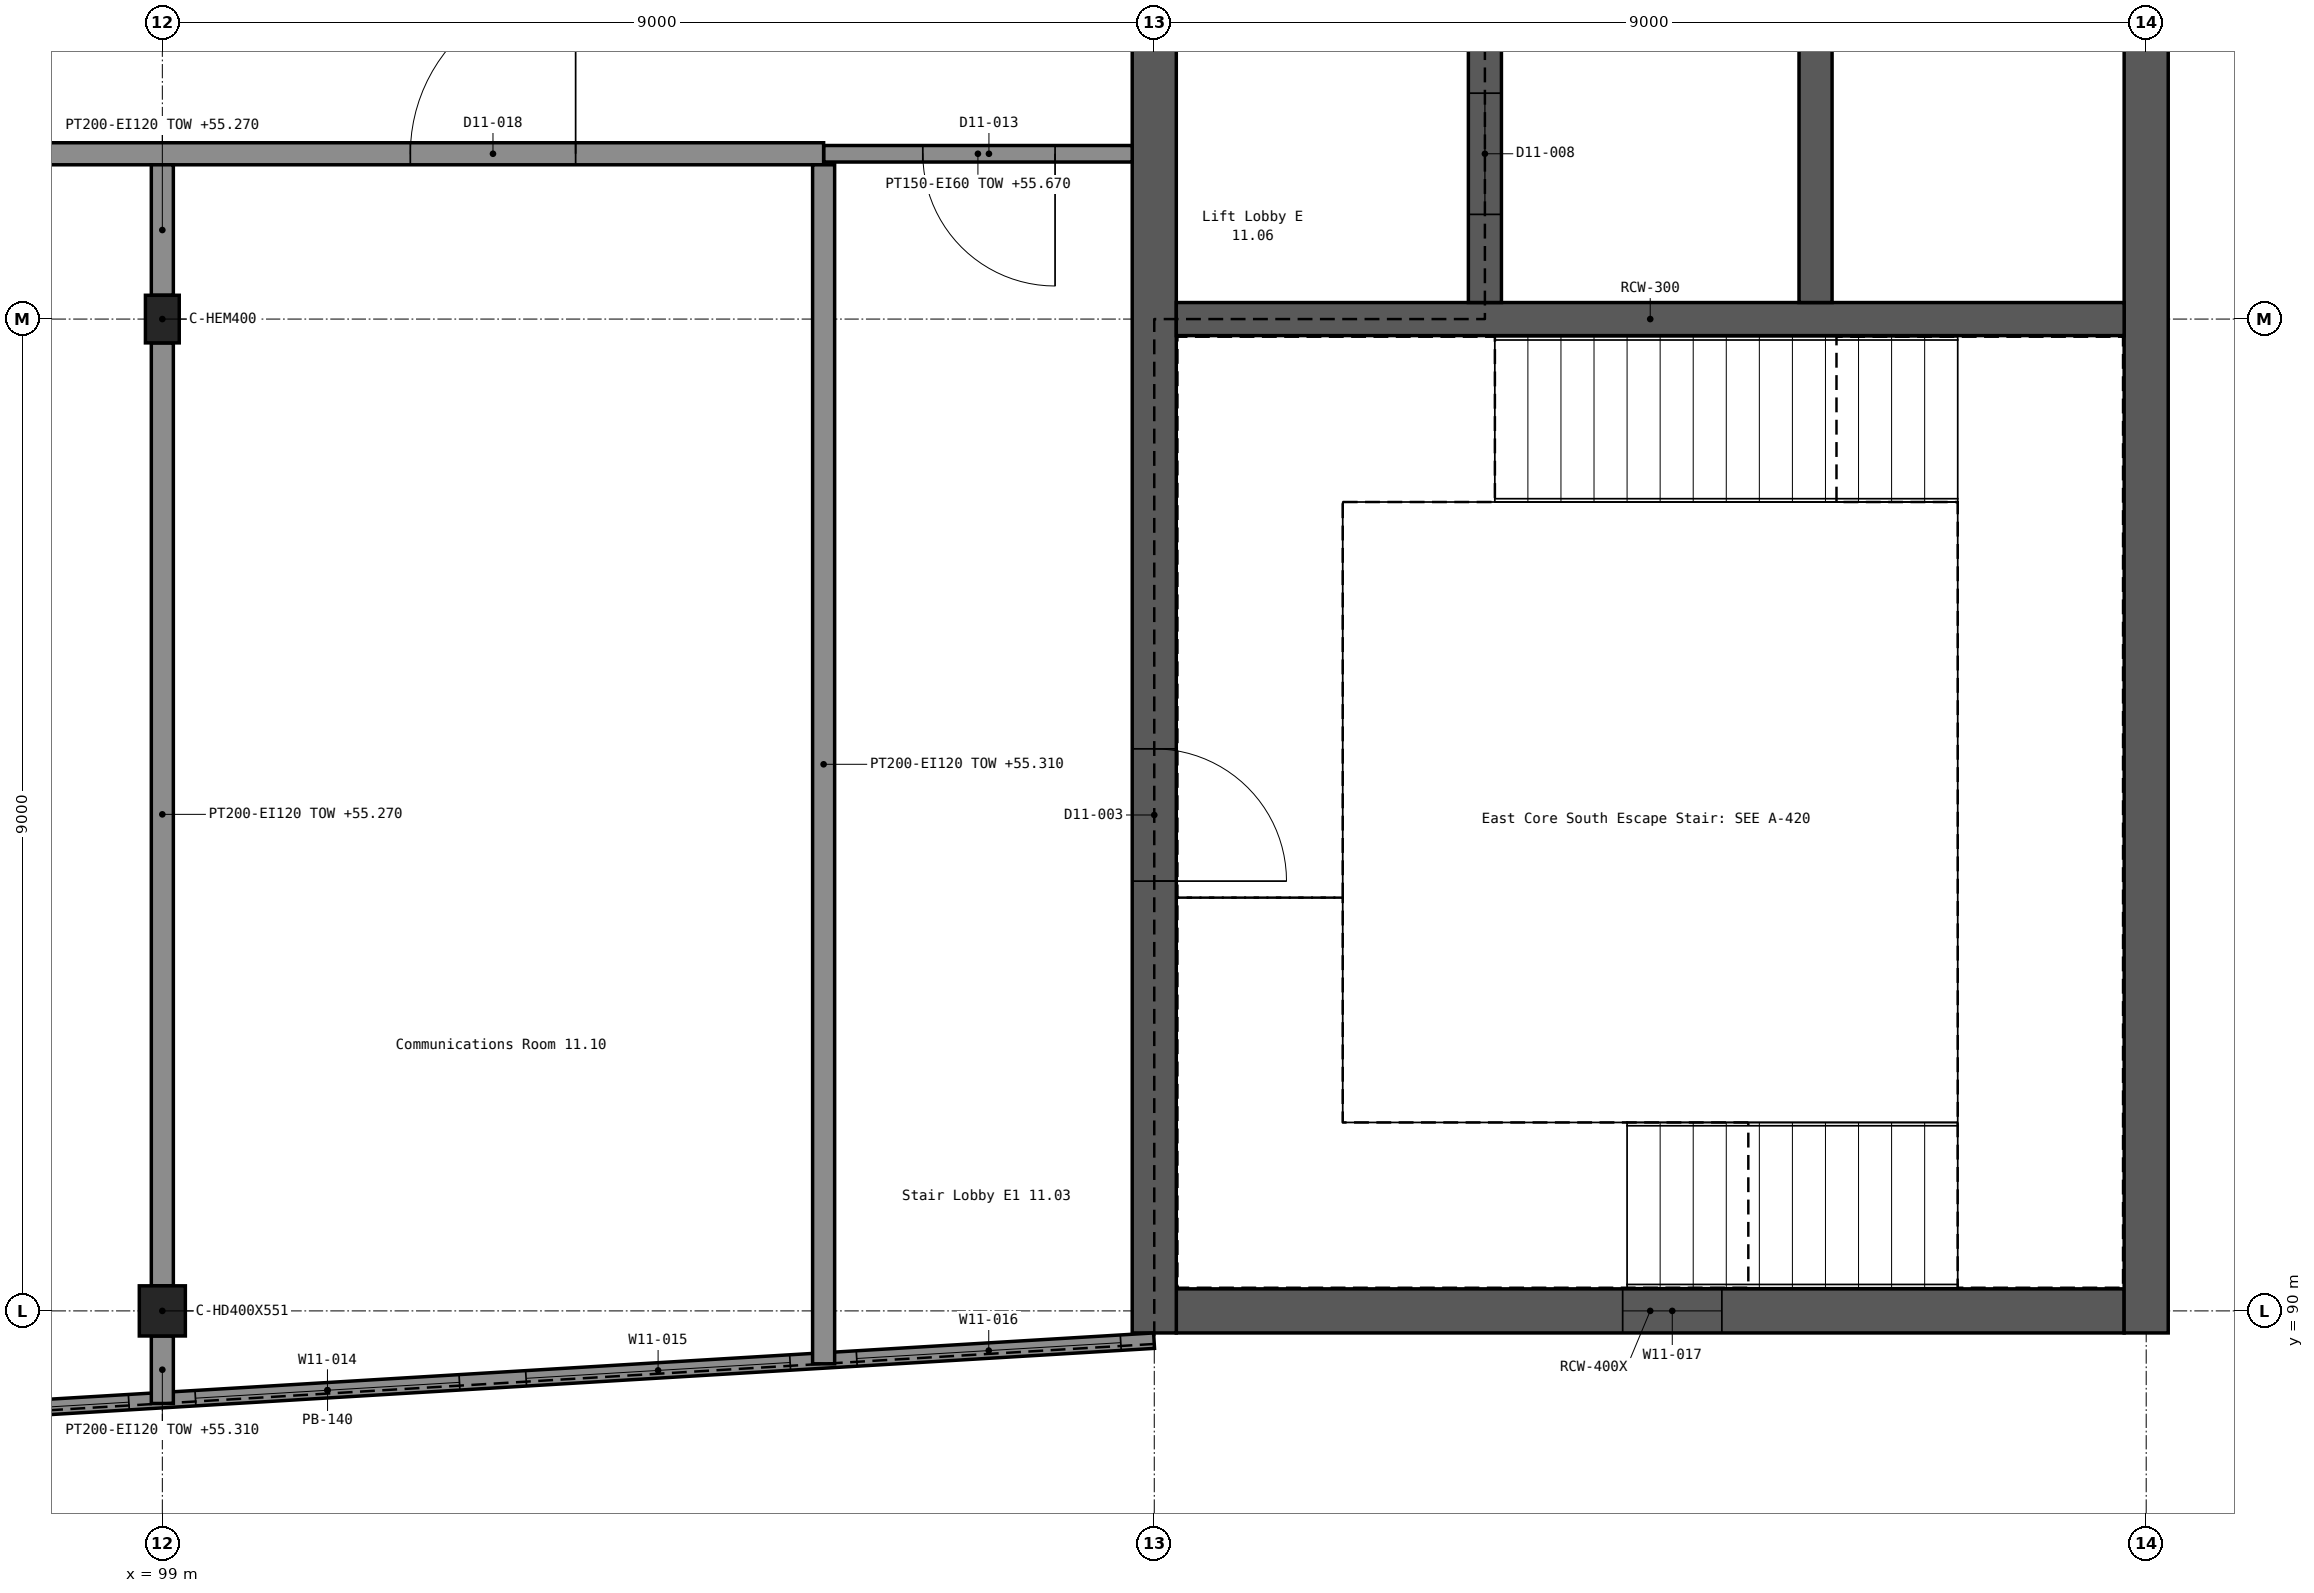
"""IFC4 building model, lengths in metres.
Left out: names, types, materials, properties, quantities, classifications, styles, units other than length and angle.
Written with IfcOpenShell. Run it as: python <this file> out.ifc"""

import sys

from ifc_helpers import new_model, si_unit, direction, frame, frame_2d, origin, origin_2d, place, context, subcontext, project, spatial, rectangle, i_section, extrude, element, fill, save


model = new_model("IFC4")
c1 = context("Model", 3, precision=1e-05, world=origin(), true_north=direction((0.0, 1.0)))
c2 = subcontext(c1, "Body", "Model", "MODEL_VIEW")
j1 = project(units=[si_unit("LENGTHUNIT", "METRE"), si_unit("PLANEANGLEUNIT", "RADIAN")], contexts=[c1])
p1 = place(None, origin())
s1 = spatial("IfcSite", under=j1, at=p1, CompositionType="ELEMENT")
p2 = place(p1, origin())
s2 = spatial("IfcBuilding", under=s1, at=p2, CompositionType="ELEMENT")
p3 = place(p2, frame((0.0, 0.0, 51.9)))
s3 = spatial("IfcBuildingStorey", under=s2, at=p3, CompositionType="ELEMENT", Elevation=51.9)
p4 = place(p3, frame((108.2, 90.0, 0.0), z_axis=(0.0, 0.0, 1.0), x_axis=(1.0, 0.0, 0.0)))
e1 = element("IfcWall", 1, at=p4, inside=s3, PredefinedType="SHEAR", context=c2, shape_type="SweptSolid", body=[
    extrude(rectangle(XDim=8.6, YDim=0.4, at=frame_2d((4.3, 0.0))), origin(), (0.0, 0.0, 1.0), 3.9),
])
p5 = place(p4, frame((4.05, 0.0, 1.2)))
e2 = element("IfcOpeningElement", 2, at=p5, cuts=e1, PredefinedType="OPENING", context=c2, shape_type="SweptSolid", body=[
    extrude(rectangle(XDim=0.9, YDim=1.5, at=frame_2d((0.45, 0.75))), frame((0.0, 0.211, 0.0), z_axis=(0.0, -1.0, 0.0), x_axis=(1.0, 0.0, 0.0)), (0.0, 0.0, 1.0), 0.422),
])
p6 = place(p3, frame((108.0, 89.8, 0.0), z_axis=(0.0, 0.0, 1.0), x_axis=(0.0, 1.0, 0.0)))
e3 = element("IfcWall", 3, at=p6, inside=s3, PredefinedType="SHEAR", context=c2, shape_type="SweptSolid", body=[
    extrude(rectangle(XDim=27.4, YDim=0.4, at=frame_2d((13.7, 0.0))), origin(), (0.0, 0.0, 1.0), 3.9),
])
p7 = place(p6, frame((4.1, 0.0, 0.0)))
e4 = element("IfcOpeningElement", 4, at=p7, cuts=e3, PredefinedType="OPENING", context=c2, shape_type="SweptSolid", body=[
    extrude(rectangle(XDim=1.2, YDim=2.1, at=frame_2d((0.6, 1.05))), frame((0.0, 0.211, 0.0), z_axis=(0.0, -1.0, 0.0), x_axis=(1.0, 0.0, 0.0)), (0.0, 0.0, 1.0), 0.422),
])
p8 = place(p6, frame((22.1, 0.0, 0.0)))
e5 = element("IfcOpeningElement", 5, at=p8, cuts=e3, PredefinedType="OPENING", context=c2, shape_type="SweptSolid", body=[
    extrude(rectangle(XDim=1.2, YDim=2.1, at=frame_2d((0.6, 1.05))), frame((0.0, 0.211, 0.0), z_axis=(0.0, -1.0, 0.0), x_axis=(1.0, 0.0, 0.0)), (0.0, 0.0, 1.0), 0.422),
])
p9 = place(p6, frame((12.5, 0.0, 0.0)))
e6 = element("IfcOpeningElement", 6, at=p9, cuts=e3, PredefinedType="OPENING", context=c2, shape_type="SweptSolid", body=[
    extrude(rectangle(XDim=2.0, YDim=2.1, at=frame_2d((1.0, 1.05))), frame((0.0, 0.211, 0.0), z_axis=(0.0, -1.0, 0.0), x_axis=(1.0, 0.0, 0.0)), (0.0, 0.0, 1.0), 0.422),
])
p10 = place(p3, frame((117.0, 89.8, 0.0), z_axis=(0.0, 0.0, 1.0), x_axis=(0.0, 1.0, 0.0)))
e7 = element("IfcWall", 7, at=p10, inside=s3, PredefinedType="SHEAR", context=c2, shape_type="SweptSolid", body=[
    extrude(rectangle(XDim=27.4, YDim=0.4, at=frame_2d((13.7, 0.0))), origin(), (0.0, 0.0, 1.0), 3.9),
])
p11 = place(p3, frame((108.2, 99.0, 0.0), z_axis=(0.0, 0.0, 1.0), x_axis=(1.0, 0.0, 0.0)))
e8 = element("IfcWall", 8, at=p11, inside=s3, PredefinedType="SHEAR", context=c2, shape_type="SweptSolid", body=[
    extrude(rectangle(XDim=8.6, YDim=0.3, at=frame_2d((4.3, 0.0))), origin(), (0.0, 0.0, 1.0), 3.9),
])
p12 = place(p3, frame((111.0, 99.15, 0.0), z_axis=(0.0, 0.0, 1.0), x_axis=(0.0, 1.0, 0.0)))
e9 = element("IfcWall", 9, at=p12, inside=s3, PredefinedType="SHEAR", context=c2, shape_type="SweptSolid", body=[
    extrude(rectangle(XDim=8.7, YDim=0.3, at=frame_2d((4.35, 0.0))), origin(), (0.0, 0.0, 1.0), 3.9),
])
p13 = place(p12, frame((0.8, 0.0, 0.0)))
e10 = element("IfcOpeningElement", 10, at=p13, cuts=e9, PredefinedType="OPENING", context=c2, shape_type="SweptSolid", body=[
    extrude(rectangle(XDim=1.1, YDim=2.1, at=frame_2d((0.55, 1.05))), frame((0.0, 0.161, 0.0), z_axis=(0.0, -1.0, 0.0), x_axis=(1.0, 0.0, 0.0)), (0.0, 0.0, 1.0), 0.322),
])
p14 = place(p12, frame((3.8, 0.0, 0.0)))
e11 = element("IfcOpeningElement", 11, at=p14, cuts=e9, PredefinedType="OPENING", context=c2, shape_type="SweptSolid", body=[
    extrude(rectangle(XDim=1.1, YDim=2.1, at=frame_2d((0.55, 1.05))), frame((0.0, 0.161, 0.0), z_axis=(0.0, -1.0, 0.0), x_axis=(1.0, 0.0, 0.0)), (0.0, 0.0, 1.0), 0.322),
])
p15 = place(p12, frame((6.8, 0.0, 0.0)))
e12 = element("IfcOpeningElement", 12, at=p15, cuts=e9, PredefinedType="OPENING", context=c2, shape_type="SweptSolid", body=[
    extrude(rectangle(XDim=1.1, YDim=2.1, at=frame_2d((0.55, 1.05))), frame((0.0, 0.161, 0.0), z_axis=(0.0, -1.0, 0.0), x_axis=(1.0, 0.0, 0.0)), (0.0, 0.0, 1.0), 0.322),
])
p16 = place(p3, frame((114.0, 99.15, 0.0), z_axis=(0.0, 0.0, 1.0), x_axis=(0.0, 1.0, 0.0)))
e13 = element("IfcWall", 13, at=p16, inside=s3, PredefinedType="SHEAR", context=c2, shape_type="SweptSolid", body=[
    extrude(rectangle(XDim=8.7, YDim=0.3, at=frame_2d((4.35, 0.0))), origin(), (0.0, 0.0, 1.0), 3.9),
])
p17 = place(p3, frame((99.0, 90.0, 0.0), z_axis=(0.0, 0.0, 1.0), x_axis=(1.0, 0.0, 0.0)))
e14 = element("IfcColumn", 14, at=p17, inside=s3, PredefinedType="COLUMN", context=c2, shape_type="SweptSolid", body=[
    extrude(i_section(OverallWidth=0.418, OverallDepth=0.455, WebThickness=0.042, FlangeThickness=0.068, FilletRadius=0.015, at=origin_2d()), origin(), (0.0, 0.0, 1.0), 3.9),
])
p18 = place(p3, frame((99.0, 99.0, 0.0), z_axis=(0.0, 0.0, 1.0), x_axis=(1.0, 0.0, 0.0)))
e15 = element("IfcColumn", 15, at=p18, inside=s3, PredefinedType="COLUMN", context=c2, shape_type="SweptSolid", body=[
    extrude(i_section(OverallWidth=0.307, OverallDepth=0.432, WebThickness=0.021, FlangeThickness=0.04, FilletRadius=0.027, at=origin_2d()), origin(), (0.0, 0.0, 1.0), 3.9),
])
p19 = place(p3, frame((93.0, 88.83, 0.0), z_axis=(0.0, 0.0, 1.0), x_axis=(0.998204826037, 0.059892614536, 0.0)))
e16 = element("IfcWall", 16, at=p19, inside=s3, PredefinedType="SOLIDWALL", context=c2, shape_type="SweptSolid", body=[
    extrude(rectangle(XDim=15.025, YDim=0.14, at=frame_2d((7.513, 0.0))), origin(), (0.0, 0.0, 1.0), 3.9),
])
p20 = place(p19, frame((0.301, 0.0, 0.6)))
e17 = element("IfcOpeningElement", 17, at=p20, cuts=e16, PredefinedType="OPENING", context=c2, shape_type="SweptSolid", body=[
    extrude(rectangle(XDim=2.4, YDim=2.4, at=frame_2d((1.2, 1.2))), frame((0.0, 0.081, 0.0), z_axis=(0.0, -1.0, 0.0), x_axis=(1.0, 0.0, 0.0)), (0.0, 0.0, 1.0), 0.162),
])
p21 = place(p19, frame((3.306, 0.0, 0.6)))
e18 = element("IfcOpeningElement", 18, at=p21, cuts=e16, PredefinedType="OPENING", context=c2, shape_type="SweptSolid", body=[
    extrude(rectangle(XDim=2.4, YDim=2.4, at=frame_2d((1.2, 1.2))), frame((0.0, 0.081, 0.0), z_axis=(0.0, -1.0, 0.0), x_axis=(1.0, 0.0, 0.0)), (0.0, 0.0, 1.0), 0.162),
])
p22 = place(p19, frame((6.312, 0.0, 0.6)))
e19 = element("IfcOpeningElement", 19, at=p22, cuts=e16, PredefinedType="OPENING", context=c2, shape_type="SweptSolid", body=[
    extrude(rectangle(XDim=2.4, YDim=2.4, at=frame_2d((1.2, 1.2))), frame((0.0, 0.081, 0.0), z_axis=(0.0, -1.0, 0.0), x_axis=(1.0, 0.0, 0.0)), (0.0, 0.0, 1.0), 0.162),
])
p23 = place(p19, frame((9.317, 0.0, 0.6)))
e20 = element("IfcOpeningElement", 20, at=p23, cuts=e16, PredefinedType="OPENING", context=c2, shape_type="SweptSolid", body=[
    extrude(rectangle(XDim=2.4, YDim=2.4, at=frame_2d((1.2, 1.2))), frame((0.0, 0.081, 0.0), z_axis=(0.0, -1.0, 0.0), x_axis=(1.0, 0.0, 0.0)), (0.0, 0.0, 1.0), 0.162),
])
p24 = place(p19, frame((12.323, 0.0, 0.6)))
e21 = element("IfcOpeningElement", 21, at=p24, cuts=e16, PredefinedType="OPENING", context=c2, shape_type="SweptSolid", body=[
    extrude(rectangle(XDim=2.4, YDim=2.4, at=frame_2d((1.2, 1.2))), frame((0.0, 0.081, 0.0), z_axis=(0.0, -1.0, 0.0), x_axis=(1.0, 0.0, 0.0)), (0.0, 0.0, 1.0), 0.162),
])
p25 = place(p3, frame((105.0, 100.5, 0.0), z_axis=(0.0, 0.0, 1.0), x_axis=(1.0, 0.0, 0.0)))
e22 = element("IfcWall", 22, at=p25, inside=s3, PredefinedType="PARTITIONING", context=c2, shape_type="SweptSolid", body=[
    extrude(rectangle(XDim=2.8, YDim=0.15, at=frame_2d((1.4, 0.0))), origin(), (0.0, 0.0, 1.0), 3.77),
])
p26 = place(p25, frame((0.9, 0.0, 0.0)))
e23 = element("IfcOpeningElement", 23, at=p26, cuts=e22, PredefinedType="OPENING", context=c2, shape_type="SweptSolid", body=[
    extrude(rectangle(XDim=1.2, YDim=2.1, at=frame_2d((0.6, 1.05))), frame((0.0, 0.086, 0.0), z_axis=(0.0, -1.0, 0.0), x_axis=(1.0, 0.0, 0.0)), (0.0, 0.0, 1.0), 0.172),
])
p27 = place(p3, frame((66.0, 100.5, 0.0), z_axis=(0.0, 0.0, 1.0), x_axis=(1.0, 0.0, 0.0)))
e24 = element("IfcWall", 24, at=p27, inside=s3, PredefinedType="PARTITIONING", context=c2, shape_type="SweptSolid", body=[
    extrude(rectangle(XDim=39.0, YDim=0.2, at=frame_2d((19.5, 0.0))), origin(), (0.0, 0.0, 1.0), 3.77),
])
p28 = place(p27, frame((2.25, 0.0, 0.0)))
e25 = element("IfcOpeningElement", 25, at=p28, cuts=e24, PredefinedType="OPENING", context=c2, shape_type="SweptSolid", body=[
    extrude(rectangle(XDim=1.5, YDim=2.4, at=frame_2d((0.75, 1.2))), frame((0.0, 0.111, 0.0), z_axis=(0.0, -1.0, 0.0), x_axis=(1.0, 0.0, 0.0)), (0.0, 0.0, 1.0), 0.222),
])
p29 = place(p27, frame((13.125, 0.0, 0.0)))
e26 = element("IfcOpeningElement", 26, at=p29, cuts=e24, PredefinedType="OPENING", context=c2, shape_type="SweptSolid", body=[
    extrude(rectangle(XDim=1.5, YDim=2.4, at=frame_2d((0.75, 1.2))), frame((0.0, 0.111, 0.0), z_axis=(0.0, -1.0, 0.0), x_axis=(1.0, 0.0, 0.0)), (0.0, 0.0, 1.0), 0.222),
])
p30 = place(p27, frame((27.75, 0.0, 0.0)))
e27 = element("IfcOpeningElement", 27, at=p30, cuts=e24, PredefinedType="OPENING", context=c2, shape_type="SweptSolid", body=[
    extrude(rectangle(XDim=1.5, YDim=2.4, at=frame_2d((0.75, 1.2))), frame((0.0, 0.111, 0.0), z_axis=(0.0, -1.0, 0.0), x_axis=(1.0, 0.0, 0.0)), (0.0, 0.0, 1.0), 0.222),
])
p31 = place(p27, frame((35.25, 0.0, 0.0)))
e28 = element("IfcOpeningElement", 28, at=p31, cuts=e24, PredefinedType="OPENING", context=c2, shape_type="SweptSolid", body=[
    extrude(rectangle(XDim=1.5, YDim=2.4, at=frame_2d((0.75, 1.2))), frame((0.0, 0.111, 0.0), z_axis=(0.0, -1.0, 0.0), x_axis=(1.0, 0.0, 0.0)), (0.0, 0.0, 1.0), 0.222),
])
p32 = place(p3, frame((99.0, 89.16, 0.0), z_axis=(0.0, 0.0, 1.0), x_axis=(0.0, 1.0, 0.0)))
e29 = element("IfcWall", 29, at=p32, inside=s3, PredefinedType="PARTITIONING", context=c2, shape_type="SweptSolid", body=[
    extrude(rectangle(XDim=0.613, YDim=0.2, at=frame_2d((0.306, 0.0))), origin(), (0.0, 0.0, 1.0), 3.41),
])
p33 = place(p3, frame((99.0, 90.228, 0.0), z_axis=(0.0, 0.0, 1.0), x_axis=(0.0, 1.0, 0.0)))
e30 = element("IfcWall", 30, at=p33, inside=s3, PredefinedType="PARTITIONING", context=c2, shape_type="SweptSolid", body=[
    extrude(rectangle(XDim=8.556, YDim=0.2, at=frame_2d((4.278, 0.0))), origin(), (0.0, 0.0, 1.0), 3.37),
])
p34 = place(p3, frame((99.0, 99.216, 0.0), z_axis=(0.0, 0.0, 1.0), x_axis=(0.0, 1.0, 0.0)))
e31 = element("IfcWall", 31, at=p34, inside=s3, PredefinedType="PARTITIONING", context=c2, shape_type="SweptSolid", body=[
    extrude(rectangle(XDim=1.184, YDim=0.2, at=frame_2d((0.592, 0.0))), origin(), (0.0, 0.0, 1.0), 3.37),
])
p35 = place(p3, frame((105.0, 89.52, 0.0), z_axis=(0.0, 0.0, 1.0), x_axis=(0.0, 1.0, 0.0)))
e32 = element("IfcWall", 32, at=p35, inside=s3, PredefinedType="PARTITIONING", context=c2, shape_type="SweptSolid", body=[
    extrude(rectangle(XDim=10.88, YDim=0.2, at=frame_2d((5.44, 0.0))), origin(), (0.0, 0.0, 1.0), 3.41),
])
p36 = place(p21, origin())
e33 = element("IfcWindow", 33, at=p36, inside=s3, PartitioningType="SINGLE_PANEL", PredefinedType="WINDOW", context=c2, shape_type="SweptSolid", body=[
    extrude(rectangle(XDim=2.4, YDim=2.4, at=frame_2d((1.2, 1.2))), frame((0.0, 0.03, 0.0), z_axis=(0.0, -1.0, 0.0), x_axis=(1.0, 0.0, 0.0)), (0.0, 0.0, 1.0), 0.06),
])
fill(e18, e33)
p37 = place(p22, origin())
e34 = element("IfcWindow", 34, at=p37, inside=s3, PartitioningType="SINGLE_PANEL", PredefinedType="WINDOW", context=c2, shape_type="SweptSolid", body=[
    extrude(rectangle(XDim=2.4, YDim=2.4, at=frame_2d((1.2, 1.2))), frame((0.0, 0.03, 0.0), z_axis=(0.0, -1.0, 0.0), x_axis=(1.0, 0.0, 0.0)), (0.0, 0.0, 1.0), 0.06),
])
fill(e19, e34)
p38 = place(p23, origin())
e35 = element("IfcWindow", 35, at=p38, inside=s3, PartitioningType="SINGLE_PANEL", PredefinedType="WINDOW", context=c2, shape_type="SweptSolid", body=[
    extrude(rectangle(XDim=2.4, YDim=2.4, at=frame_2d((1.2, 1.2))), frame((0.0, 0.03, 0.0), z_axis=(0.0, -1.0, 0.0), x_axis=(1.0, 0.0, 0.0)), (0.0, 0.0, 1.0), 0.06),
])
fill(e20, e35)
p39 = place(p24, origin())
e36 = element("IfcWindow", 36, at=p39, inside=s3, PartitioningType="SINGLE_PANEL", PredefinedType="WINDOW", context=c2, shape_type="SweptSolid", body=[
    extrude(rectangle(XDim=2.4, YDim=2.4, at=frame_2d((1.2, 1.2))), frame((0.0, 0.03, 0.0), z_axis=(0.0, -1.0, 0.0), x_axis=(1.0, 0.0, 0.0)), (0.0, 0.0, 1.0), 0.06),
])
fill(e21, e36)
p40 = place(p5, origin())
e37 = element("IfcWindow", 37, at=p40, inside=s3, PartitioningType="SINGLE_PANEL", PredefinedType="WINDOW", context=c2, shape_type="SweptSolid", body=[
    extrude(rectangle(XDim=0.9, YDim=1.5, at=frame_2d((0.45, 0.75))), frame((0.0, 0.03, 0.0), z_axis=(0.0, -1.0, 0.0), x_axis=(1.0, 0.0, 0.0)), (0.0, 0.0, 1.0), 0.06),
])
fill(e2, e37)
p41 = place(p7, frame((1.2, 0.0, 0.0), z_axis=(0.0, 0.0, 1.0), x_axis=(-1.0, 0.0, 0.0)))
e38 = element("IfcDoor", 38, at=p41, inside=s3, OperationType="SINGLE_SWING_RIGHT", PredefinedType="DOOR", context=c2, shape_type="SweptSolid", body=[
    extrude(rectangle(XDim=1.2, YDim=2.1, at=frame_2d((0.6, 1.05))), frame((0.0, 0.025, 0.0), z_axis=(0.0, -1.0, 0.0), x_axis=(1.0, 0.0, 0.0)), (0.0, 0.0, 1.0), 0.05),
])
fill(e4, e38)
p42 = place(p13, origin())
e39 = element("IfcDoor", 39, at=p42, inside=s3, OperationType="DOUBLE_DOOR_SLIDING", PredefinedType="DOOR", context=c2, shape_type="SweptSolid", body=[
    extrude(rectangle(XDim=1.1, YDim=2.1, at=frame_2d((0.55, 1.05))), frame((0.0, 0.025, 0.0), z_axis=(0.0, -1.0, 0.0), x_axis=(1.0, 0.0, 0.0)), (0.0, 0.0, 1.0), 0.05),
])
fill(e10, e39)
p43 = place(p26, frame((1.2, 0.0, 0.0), z_axis=(0.0, 0.0, 1.0), x_axis=(-1.0, 0.0, 0.0)))
e40 = element("IfcDoor", 40, at=p43, inside=s3, OperationType="SINGLE_SWING_LEFT", PredefinedType="DOOR", context=c2, shape_type="SweptSolid", body=[
    extrude(rectangle(XDim=1.2, YDim=2.1, at=frame_2d((0.6, 1.05))), frame((0.0, 0.025, 0.0), z_axis=(0.0, -1.0, 0.0), x_axis=(1.0, 0.0, 0.0)), (0.0, 0.0, 1.0), 0.05),
])
fill(e23, e40)
p44 = place(p31, origin())
e41 = element("IfcDoor", 41, at=p44, inside=s3, OperationType="DOUBLE_DOOR_SINGLE_SWING", PredefinedType="DOOR", context=c2, shape_type="SweptSolid", body=[
    extrude(rectangle(XDim=1.5, YDim=2.4, at=frame_2d((0.75, 1.2))), frame((0.0, 0.025, 0.0), z_axis=(0.0, -1.0, 0.0), x_axis=(1.0, 0.0, 0.0)), (0.0, 0.0, 1.0), 0.05),
])
fill(e28, e41)
save(model, sys.argv[1])
